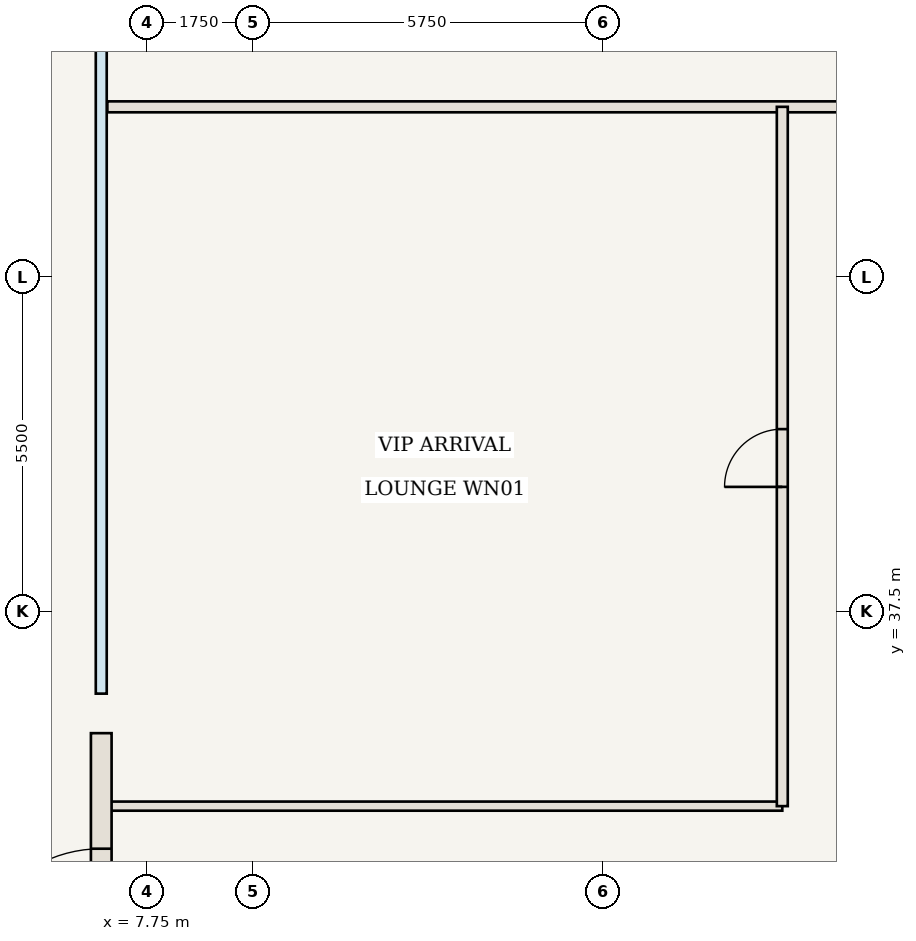
"""IFC4 building model, lengths in metres.
Left out: names, types, materials, properties, quantities, classifications, styles, units other than length and angle.
Written with IfcOpenShell. Run it as: python <this file> out.ifc"""

import sys

from ifc_helpers import new_model, si_unit, direction, frame, frame_2d, origin, place, context, subcontext, project, spatial, rectangle, extrude, element, fill, save


model = new_model("IFC4")
c1 = context("Model", 3, precision=1e-05, world=origin(), true_north=direction((0.0, 1.0)))
c2 = subcontext(c1, "Body", "Model", "MODEL_VIEW")
j1 = project(units=[si_unit("LENGTHUNIT", "METRE"), si_unit("PLANEANGLEUNIT", "RADIAN")], contexts=[c1])
p1 = place(None, origin())
s1 = spatial("IfcSite", under=j1, at=p1, CompositionType="ELEMENT")
p2 = place(p1, origin())
s2 = spatial("IfcBuilding", under=s1, at=p2, CompositionType="ELEMENT")
p3 = place(p2, origin())
s3 = spatial("IfcBuildingStorey", under=s2, at=p3, CompositionType="ELEMENT", Elevation=0.0)
p4 = place(p3, frame((7.05, 34.3, 0.0), z_axis=(0.0, 0.0, 1.0), x_axis=(1.0, 0.0, 0.0)))
e1 = element("IfcWall", 1, at=p4, inside=s3, PredefinedType="STANDARD", context=c2, shape_type="SweptSolid", body=[
    extrude(rectangle(XDim=11.15, YDim=0.15, at=frame_2d((5.575, 0.0))), origin(), (0.0, 0.0, 1.0), 6.41),
])
p5 = place(p3, frame((7.1, 45.8, 0.0), z_axis=(0.0, 0.0, 1.0), x_axis=(1.0, 0.0, 0.0)))
e2 = element("IfcWall", 2, at=p5, inside=s3, PredefinedType="STANDARD", context=c2, shape_type="SweptSolid", body=[
    extrude(rectangle(XDim=27.1, YDim=0.18, at=frame_2d((13.55, 0.0))), origin(), (0.0, 0.0, 1.0), 6.41),
])
p6 = place(p5, frame((23.55, 0.0, 0.0)))
e3 = element("IfcOpeningElement", 3, at=p6, cuts=e2, PredefinedType="OPENING", context=c2, shape_type="SweptSolid", body=[
    extrude(rectangle(XDim=1.25, YDim=2.2, at=frame_2d((0.625, 1.1))), frame((0.0, 0.1, 0.0), z_axis=(0.0, -1.0, 0.0), x_axis=(1.0, 0.0, 0.0)), (0.0, 0.0, 1.0), 0.2),
])
p7 = place(p3, frame((18.2, 34.3, 0.0), z_axis=(0.0, 0.0, 1.0), x_axis=(0.0, 1.0, 0.0)))
e4 = element("IfcWall", 4, at=p7, inside=s3, PredefinedType="STANDARD", context=c2, shape_type="SweptSolid", body=[
    extrude(rectangle(XDim=11.5, YDim=0.18, at=frame_2d((5.75, 0.0))), origin(), (0.0, 0.0, 1.0), 6.41),
])
p8 = place(p7, frame((5.25, 0.0, 0.0)))
e5 = element("IfcOpeningElement", 5, at=p8, cuts=e4, PredefinedType="OPENING", context=c2, shape_type="SweptSolid", body=[
    extrude(rectangle(XDim=0.95, YDim=2.15, at=frame_2d((0.475, 1.075))), frame((0.0, 0.1, 0.0), z_axis=(0.0, -1.0, 0.0), x_axis=(1.0, 0.0, 0.0)), (0.0, 0.0, 1.0), 0.2),
])
p9 = place(p3, frame((7.0, 29.5, 0.0), z_axis=(0.0, 0.0, 1.0), x_axis=(0.0, 1.0, 0.0)))
e6 = element("IfcWall", 6, at=p9, inside=s3, PredefinedType="USERDEFINED", context=c2, shape_type="SweptSolid", body=[
    extrude(rectangle(XDim=6.0, YDim=0.34, at=frame_2d((3.0, 0.0))), origin(), (0.0, 0.0, 1.0), 5.51),
])
p10 = place(p9, frame((1.9, 0.0, 0.0)))
e7 = element("IfcOpeningElement", 7, at=p10, cuts=e6, PredefinedType="OPENING", context=c2, shape_type="SweptSolid", body=[
    extrude(rectangle(XDim=2.2, YDim=2.4, at=frame_2d((1.1, 1.2))), frame((0.0, 0.18, 0.0), z_axis=(0.0, -1.0, 0.0), x_axis=(1.0, 0.0, 0.0)), (0.0, 0.0, 1.0), 0.36),
])
p11 = place(p8, origin())
e8 = element("IfcDoor", 8, at=p11, inside=s3, OperationType="SINGLE_SWING_LEFT", PredefinedType="DOOR", context=c2, shape_type="SweptSolid", body=[
    extrude(rectangle(XDim=0.95, YDim=2.15, at=frame_2d((0.475, 1.075))), frame((0.0, 0.025, 0.0), z_axis=(0.0, -1.0, 0.0), x_axis=(1.0, 0.0, 0.0)), (0.0, 0.0, 1.0), 0.05),
])
fill(e5, e8)
p12 = place(p10, origin())
e9 = element("IfcDoor", 9, at=p12, inside=s3, OperationType="DOUBLE_DOOR_SINGLE_SWING", PredefinedType="DOOR", context=c2, shape_type="SweptSolid", body=[
    extrude(rectangle(XDim=2.2, YDim=2.4, at=frame_2d((1.1, 1.2))), frame((0.0, 0.025, 0.0), z_axis=(0.0, -1.0, 0.0), x_axis=(1.0, 0.0, 0.0)), (0.0, 0.0, 1.0), 0.05),
])
fill(e7, e9)
save(model, sys.argv[1])
